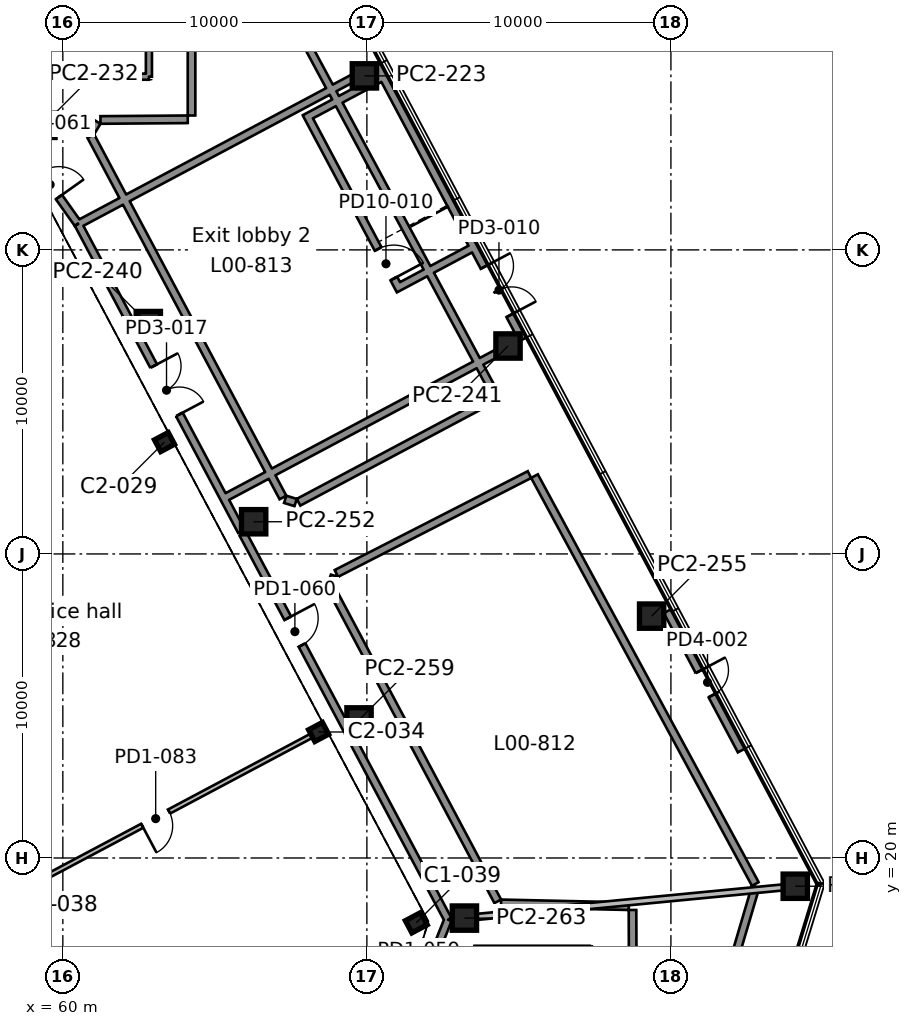
"""IFC4 building model, lengths in metres.
Left out: names, types, materials, properties, quantities, classifications, styles, units other than length and angle.
Written with IfcOpenShell. Run it as: python <this file> out.ifc"""

import sys

from ifc_helpers import new_model, si_unit, direction, frame, frame_2d, origin, origin_2d, place, context, subcontext, project, spatial, rectangle, i_section, extrude, element, fill, save


model = new_model("IFC4")
c1 = context("Model", 3, precision=1e-05, world=origin(), true_north=direction((0.0, 1.0)))
c2 = subcontext(c1, "Body", "Model", "MODEL_VIEW")
j1 = project(units=[si_unit("LENGTHUNIT", "METRE"), si_unit("PLANEANGLEUNIT", "RADIAN")], contexts=[c1])
p1 = place(None, origin())
s1 = spatial("IfcSite", under=j1, at=p1, CompositionType="ELEMENT")
p2 = place(p1, origin())
s2 = spatial("IfcBuilding", under=s1, at=p2, CompositionType="ELEMENT")
p3 = place(p2, origin())
s3 = spatial("IfcBuildingStorey", under=s2, at=p3, CompositionType="ELEMENT", Elevation=0.0)
p4 = place(p3, frame((71.625, 17.871, 0.0), z_axis=(0.0, 0.0, 1.0), x_axis=(-0.469471562786, 0.882947592859, 0.0)))
e1 = element("IfcColumn", 1, at=p4, inside=s3, PredefinedType="COLUMN", context=c2, shape_type="SweptSolid", body=[
    extrude(i_section(OverallWidth=0.455, OverallDepth=0.569, WebThickness=0.078, FlangeThickness=0.125, FilletRadius=0.015, at=origin_2d()), origin(), (0.0, 0.0, 1.0), 7.0),
])
for number, where, z_axis, x_axis in (
    (2, (68.413, 24.144, 0.0), (0.0, 0.0, 1.0), (-0.469, 0.883, 0.0)),
    (3, (63.343, 33.68, 0.0), (0.0, 0.0, 1.0), (-0.469, 0.883, 0.0)),
):
    element("IfcColumn", number, at=place(p3, frame(where, z_axis=z_axis, x_axis=x_axis)), inside=s3, PredefinedType="COLUMN", context=c2, shape_type="SweptSolid", body=[
        extrude(i_section(OverallWidth=0.437, OverallDepth=0.513, WebThickness=0.061, FlangeThickness=0.097, FilletRadius=0.015, at=origin_2d()), origin(), (0.0, 0.0, 1.0), 7.0),
    ])
for number, where, z_axis, x_axis in (
    (4, (73.208, 18.023, 0.0), (0.0, 0.0, 1.0), (1.0, 0.0, 0.0)),
    (5, (84.09, 19.071, 0.0), (0.0, 0.0, 1.0), (1.0, 0.0, 0.0)),
    (6, (69.742, 24.541, 0.0), (0.0, 0.0, 1.0), (1.0, 0.0, 0.0)),
    (7, (79.366, 27.955, 0.0), (0.0, 0.0, 1.0), (1.0, 0.0, 0.0)),
    (8, (66.276, 31.059, 0.0), (0.0, 0.0, 1.0), (1.0, 0.0, 0.0)),
    (9, (74.642, 36.839, 0.0), (0.0, 0.0, 1.0), (1.0, 0.0, 0.0)),
    (10, (62.811, 37.577, 0.0), (0.0, 0.0, 1.0), (1.0, 0.0, 0.0)),
    (11, (59.345, 44.096, 0.0), (0.0, 0.0, 1.0), (1.0, 0.0, 0.0)),
    (12, (69.918, 45.723, 0.0), (0.0, 0.0, 1.0), (1.0, 0.0, 0.0)),
):
    element("IfcColumn", number, at=place(p3, frame(where, z_axis=z_axis, x_axis=x_axis)), inside=s3, PredefinedType="COLUMN", context=c2, shape_type="SweptSolid", body=[
        extrude(rectangle(XDim=0.8, YDim=0.8, at=origin_2d()), origin(), (0.0, 0.0, 1.0), 6.37),
    ])
p5 = place(p3, frame((82.379, 23.567, 0.0), z_axis=(0.0, 0.0, 1.0), x_axis=(-0.469469391506, 0.882948747345, 0.0)))
e13 = element("IfcWall", 13, at=p5, inside=s3, PredefinedType="SOLIDWALL", context=c2, shape_type="SweptSolid", body=[
    extrude(rectangle(XDim=5.189, YDim=0.4, at=frame_2d((2.594, 0.0))), origin(), (0.0, 0.0, 1.0), 6.37),
])
p6 = place(p5, frame((2.052, 0.0, 0.0)))
e14 = element("IfcOpeningElement", 14, at=p6, cuts=e13, PredefinedType="OPENING", context=c2, shape_type="SweptSolid", body=[
    extrude(rectangle(XDim=0.9, YDim=2.1, at=frame_2d((0.45, 1.05))), frame((0.0, 0.21, 0.0), z_axis=(0.0, -1.0, 0.0), x_axis=(1.0, 0.0, 0.0)), (0.0, 0.0, 1.0), 0.42),
])
p7 = place(p3, frame((75.189, 37.088, 0.0), z_axis=(0.0, 0.0, 1.0), x_axis=(-0.469475745628, 0.88294536879, 0.0)))
e15 = element("IfcWall", 15, at=p7, inside=s3, PredefinedType="SOLIDWALL", context=c2, shape_type="SweptSolid", body=[
    extrude(rectangle(XDim=10.209, YDim=0.4, at=frame_2d((5.104, 0.0))), origin(), (0.0, 0.0, 1.0), 6.37),
])
p8 = place(p7, frame((0.9, 0.0, 0.0)))
e16 = element("IfcOpeningElement", 16, at=p8, cuts=e15, PredefinedType="OPENING", context=c2, shape_type="SweptSolid", body=[
    extrude(rectangle(XDim=1.8, YDim=2.1, at=frame_2d((0.9, 1.05))), frame((0.0, 0.21, 0.0), z_axis=(0.0, -1.0, 0.0), x_axis=(1.0, 0.0, 0.0)), (0.0, 0.0, 1.0), 0.42),
])
p9 = place(p3, frame((78.76, 11.985, 7.0), z_axis=(0.0, 0.0, 1.0), x_axis=(-0.003678581112, 0.999993233998, 0.0)))
e17 = element("IfcWall", 17, at=p9, inside=s3, PredefinedType="STANDARD", context=c2, shape_type="SweptSolid", body=[
    extrude(rectangle(XDim=6.305, YDim=0.25, at=frame_2d((3.152, 0.0))), origin(), (0.0, 0.0, 1.0), 0.65),
])
p10 = place(p3, frame((78.615, 18.415, 7.0), z_axis=(0.0, 0.0, 1.0), x_axis=(-0.999755151848, 0.022127728178, 0.0)))
e18 = element("IfcWall", 18, at=p10, inside=s3, PredefinedType="STANDARD", context=c2, shape_type="SweptSolid", body=[
    extrude(rectangle(XDim=4.204, YDim=0.25, at=frame_2d((2.102, 0.0))), origin(), (0.0, 0.0, 1.0), 0.65),
])
p11 = place(p3, frame((74.304, 18.574, 7.0), z_axis=(0.0, 0.0, 1.0), x_axis=(-0.469619931493, 0.882868687827, 0.0)))
e19 = element("IfcWall", 19, at=p11, inside=s3, PredefinedType="STANDARD", context=c2, shape_type="SweptSolid", body=[
    extrude(rectangle(XDim=11.637, YDim=0.25, at=frame_2d((5.819, 0.0))), origin(), (0.0, 0.0, 1.0), 0.65),
])
p12 = place(p3, frame((68.83, 28.944, 7.0), z_axis=(0.0, 0.0, 1.0), x_axis=(0.292496972515, 0.956266448784, 0.0)))
e20 = element("IfcWall", 20, at=p12, inside=s3, PredefinedType="STANDARD", context=c2, shape_type="SweptSolid", body=[
    extrude(rectangle(XDim=0.356, YDim=0.25, at=frame_2d((0.178, 0.0))), origin(), (0.0, 0.0, 1.0), 0.65),
])
p13 = place(p3, frame((68.997, 29.359, 7.0), z_axis=(0.0, 0.0, 1.0), x_axis=(0.890192001807, 0.455585557189, 0.0)))
e21 = element("IfcWall", 21, at=p13, inside=s3, PredefinedType="STANDARD", context=c2, shape_type="SweptSolid", body=[
    extrude(rectangle(XDim=7.134, YDim=0.25, at=frame_2d((3.567, 0.0))), origin(), (0.0, 0.0, 1.0), 0.65),
])
p14 = place(p3, frame((75.513, 32.559, 7.0), z_axis=(0.0, 0.0, 1.0), x_axis=(0.476092369677, -0.879395278322, 0.0)))
e22 = element("IfcWall", 22, at=p14, inside=s3, PredefinedType="STANDARD", context=c2, shape_type="SweptSolid", body=[
    extrude(rectangle(XDim=15.254, YDim=0.25, at=frame_2d((7.627, 0.0))), origin(), (0.0, 0.0, 1.0), 0.65),
])
p15 = place(p3, frame((82.785, 19.05, 7.0), z_axis=(0.0, 0.0, 1.0), x_axis=(-0.28349877708, -0.958972597833, 0.0)))
e23 = element("IfcWall", 23, at=p15, inside=s3, PredefinedType="STANDARD", context=c2, shape_type="SweptSolid", body=[
    extrude(rectangle(XDim=12.437, YDim=0.25, at=frame_2d((6.219, 0.0))), origin(), (0.0, 0.0, 1.0), 0.65),
])
p16 = place(p3, frame((61.932, 58.099, 7.0), z_axis=(0.0, 0.0, 1.0), x_axis=(0.473465440849, -0.880812395645, 0.0)))
e24 = element("IfcWall", 24, at=p16, inside=s3, PredefinedType="STANDARD", context=c2, shape_type="SweptSolid", body=[
    extrude(rectangle(XDim=25.663, YDim=0.25, at=frame_2d((12.831, 0.0))), origin(), (0.0, 0.0, 1.0), 0.65),
])
p17 = place(p3, frame((74.092, 35.399, 7.0), z_axis=(0.0, 0.0, 1.0), x_axis=(-0.292409013933, -0.956293348597, 0.0)))
e25 = element("IfcWall", 25, at=p17, inside=s3, PredefinedType="STANDARD", context=c2, shape_type="SweptSolid", body=[
    extrude(rectangle(XDim=0.358, YDim=0.25, at=frame_2d((0.179, 0.0))), origin(), (0.0, 0.0, 1.0), 0.65),
])
p18 = place(p3, frame((73.926, 34.983, 7.0), z_axis=(0.0, 0.0, 1.0), x_axis=(-0.882946601909, -0.469473426487, 0.0)))
e26 = element("IfcWall", 26, at=p18, inside=s3, PredefinedType="STANDARD", context=c2, shape_type="SweptSolid", body=[
    extrude(rectangle(XDim=6.993, YDim=0.25, at=frame_2d((3.497, 0.0))), origin(), (0.0, 0.0, 1.0), 0.65),
])
p19 = place(p3, frame((67.656, 31.691, 7.0), z_axis=(0.0, 0.0, 1.0), x_axis=(-0.956351571051, 0.292218535599, 0.0)))
e27 = element("IfcWall", 27, at=p19, inside=s3, PredefinedType="STANDARD", context=c2, shape_type="SweptSolid", body=[
    extrude(rectangle(XDim=0.358, YDim=0.25, at=frame_2d((0.179, 0.0))), origin(), (0.0, 0.0, 1.0), 0.65),
])
p20 = place(p3, frame((67.24, 31.857, 7.0), z_axis=(0.0, 0.0, 1.0), x_axis=(-0.469474314258, 0.88294612987, 0.0)))
e28 = element("IfcWall", 28, at=p20, inside=s3, PredefinedType="STANDARD", context=c2, shape_type="SweptSolid", body=[
    extrude(rectangle(XDim=13.462, YDim=0.25, at=frame_2d((6.731, 0.0))), origin(), (0.0, 0.0, 1.0), 0.65),
])
p21 = place(p3, frame((60.923, 43.866, 7.0), z_axis=(0.0, 0.0, 1.0), x_axis=(0.515472974842, 0.856905836255, 0.0)))
e29 = element("IfcWall", 29, at=p21, inside=s3, PredefinedType="STANDARD", context=c2, shape_type="SweptSolid", body=[
    extrude(rectangle(XDim=0.404, YDim=0.25, at=frame_2d((0.202, 0.0))), origin(), (0.0, 0.0, 1.0), 0.65),
])
p22 = place(p3, frame((61.237, 44.273, 7.0), z_axis=(0.0, 0.0, 1.0), x_axis=(0.999970067376, 0.007737205691, 0.0)))
e30 = element("IfcWall", 30, at=p22, inside=s3, PredefinedType="STANDARD", context=c2, shape_type="SweptSolid", body=[
    extrude(rectangle(XDim=2.871, YDim=0.25, at=frame_2d((1.436, 0.0))), origin(), (0.0, 0.0, 1.0), 0.65),
])
p23 = place(p3, frame((64.233, 44.42, 7.0), z_axis=(0.0, 0.0, 1.0), x_axis=(0.0, 1.0, 0.0)))
e31 = element("IfcWall", 31, at=p23, inside=s3, PredefinedType="STANDARD", context=c2, shape_type="SweptSolid", body=[
    extrude(rectangle(XDim=6.353, YDim=0.25, at=frame_2d((3.177, 0.0))), origin(), (0.0, 0.0, 1.0), 0.65),
])
for number, where, z_axis, x_axis in (
    (32, (73.535, 17.013, 6.92), (0.0, 0.0, 1.0), (1.0, 0.0, 0.0)),
    (33, (62.831, 45.697, 6.92), (0.0, 0.0, 1.0), (-1.0, 0.0, 0.0)),
    (34, (62.831, 49.497, 6.92), (0.0, 0.0, 1.0), (0.0, -1.0, 0.0)),
):
    element("IfcWall", number, at=place(p3, frame(where, z_axis=z_axis, x_axis=x_axis)), inside=s3, PredefinedType="SOLIDWALL", context=c2, shape_type="SweptSolid", body=[
        extrude(rectangle(XDim=3.8, YDim=0.2, at=frame_2d((1.9, 0.0))), origin(), (0.0, 0.0, 1.0), 0.18),
    ])
p24 = place(p3, frame((83.69, 19.032, 0.0), z_axis=(0.0, 0.0, 1.0), x_axis=(-0.995397009029, -0.095837333105, 0.0)))
e35 = element("IfcWall", 35, at=p24, inside=s3, PredefinedType="PARTITIONING", context=c2, shape_type="SweptSolid", body=[
    extrude(rectangle(XDim=10.129, YDim=0.2, at=frame_2d((5.064, 0.0))), origin(), (0.0, 0.0, 1.0), 6.37),
])
p25 = place(p3, frame((72.669, 17.971, 0.0), z_axis=(0.0, 0.0, 1.0), x_axis=(-0.370009777786, -0.929027859831, 0.0)))
e36 = element("IfcWall", 36, at=p25, inside=s3, PredefinedType="SOLIDWALL", context=c2, shape_type="SweptSolid", body=[
    extrude(rectangle(XDim=5.184, YDim=0.25, at=frame_2d((2.592, 0.0))), origin(), (0.0, 0.0, 1.0), 6.37),
])
p26 = place(p25, frame((2.092, 0.0, 0.0)))
e37 = element("IfcOpeningElement", 37, at=p26, cuts=e36, PredefinedType="OPENING", context=c2, shape_type="SweptSolid", body=[
    extrude(rectangle(XDim=1.0, YDim=2.1, at=frame_2d((0.5, 1.05))), frame((0.0, 0.135, 0.0), z_axis=(0.0, -1.0, 0.0), x_axis=(1.0, 0.0, 0.0)), (0.0, 0.0, 1.0), 0.27),
])
p27 = place(p3, frame((74.242, 36.585, 0.0), z_axis=(0.0, 0.0, 1.0), x_axis=(-0.882936179938, -0.469493026738, 0.0)))
e38 = element("IfcWall", 38, at=p27, inside=s3, PredefinedType="SOLIDWALL", context=c2, shape_type="SweptSolid", body=[
    extrude(rectangle(XDim=10.127, YDim=0.25, at=frame_2d((5.063, 0.0))), origin(), (0.0, 0.0, 1.0), 6.37),
])
p28 = place(p3, frame((65.303, 31.825, 0.0), z_axis=(0.0, 0.0, 1.0), x_axis=(0.46947695358, -0.882944726502, 0.0)))
e39 = element("IfcWall", 39, at=p28, inside=s3, PredefinedType="SOLIDWALL", context=c2, shape_type="SweptSolid", body=[
    extrude(rectangle(XDim=1.22, YDim=0.25, at=frame_2d((0.61, 0.0))), origin(), (0.0, 0.0, 1.0), 6.37),
])
p29 = place(p3, frame((65.923, 30.659, 0.0), z_axis=(0.0, 0.0, 1.0), x_axis=(0.469479540895, -0.882943350777, 0.0)))
e40 = element("IfcWall", 40, at=p29, inside=s3, PredefinedType="SOLIDWALL", context=c2, shape_type="SweptSolid", body=[
    extrude(rectangle(XDim=7.283, YDim=0.25, at=frame_2d((3.642, 0.0))), origin(), (0.0, 0.0, 1.0), 6.37),
])
p30 = place(p29, frame((3.141, 0.0, 0.0)))
e41 = element("IfcOpeningElement", 41, at=p30, cuts=e40, PredefinedType="OPENING", context=c2, shape_type="SweptSolid", body=[
    extrude(rectangle(XDim=1.0, YDim=2.1, at=frame_2d((0.5, 1.05))), frame((0.0, 0.135, 0.0), z_axis=(0.0, -1.0, 0.0), x_axis=(1.0, 0.0, 0.0)), (0.0, 0.0, 1.0), 0.27),
])
p31 = place(p3, frame((69.389, 24.141, 0.0), z_axis=(0.0, 0.0, 1.0), x_axis=(0.469461736628, -0.882952817449, 0.0)))
e42 = element("IfcWall", 42, at=p31, inside=s3, PredefinedType="SOLIDWALL", context=c2, shape_type="SweptSolid", body=[
    extrude(rectangle(XDim=6.988, YDim=0.25, at=frame_2d((3.494, 0.0))), origin(), (0.0, 0.0, 1.0), 6.37),
])
p32 = place(p3, frame((69.518, 45.635, 0.0), z_axis=(0.0, 0.0, 1.0), x_axis=(-0.882956154604, -0.46945546013, 0.0)))
e43 = element("IfcWall", 43, at=p32, inside=s3, PredefinedType="SOLIDWALL", context=c2, shape_type="SweptSolid", body=[
    extrude(rectangle(XDim=10.206, YDim=0.25, at=frame_2d((5.103, 0.0))), origin(), (0.0, 0.0, 1.0), 6.37),
])
p33 = place(p3, frame((60.505, 40.848, 0.0), z_axis=(0.0, 0.0, 1.0), x_axis=(0.469448377302, -0.882959920409, 0.0)))
e44 = element("IfcWall", 44, at=p33, inside=s3, PredefinedType="SOLIDWALL", context=c2, shape_type="SweptSolid", body=[
    extrude(rectangle(XDim=4.059, YDim=0.25, at=frame_2d((2.03, 0.0))), origin(), (0.0, 0.0, 1.0), 6.37),
])
p34 = place(p3, frame((62.457, 37.177, 0.0), z_axis=(0.0, 0.0, 1.0), x_axis=(0.469458615732, -0.882954476808, 0.0)))
e45 = element("IfcWall", 45, at=p34, inside=s3, PredefinedType="SOLIDWALL", context=c2, shape_type="SweptSolid", body=[
    extrude(rectangle(XDim=6.06, YDim=0.25, at=frame_2d((3.03, 0.0))), origin(), (0.0, 0.0, 1.0), 6.37),
])
p35 = place(p34, frame((1.13, 0.0, 0.0)))
e46 = element("IfcOpeningElement", 46, at=p35, cuts=e45, PredefinedType="OPENING", context=c2, shape_type="SweptSolid", body=[
    extrude(rectangle(XDim=1.8, YDim=2.1, at=frame_2d((0.9, 1.05))), frame((0.0, 0.135, 0.0), z_axis=(0.0, -1.0, 0.0), x_axis=(1.0, 0.0, 0.0)), (0.0, 0.0, 1.0), 0.27),
])
p36 = place(p3, frame((58.672, 43.428, 0.0), z_axis=(0.0, 0.0, 1.0), x_axis=(0.578928632739, -0.815378217881, 0.0)))
e47 = element("IfcWall", 47, at=p36, inside=s3, PredefinedType="SOLIDWALL", context=c2, shape_type="SweptSolid", body=[
    extrude(rectangle(XDim=3.143, YDim=0.25, at=frame_2d((1.572, 0.0))), origin(), (0.0, 0.0, 1.0), 6.37),
])
p37 = place(p36, frame((1.072, 0.0, 0.0)))
e48 = element("IfcOpeningElement", 48, at=p37, cuts=e47, PredefinedType="OPENING", context=c2, shape_type="SweptSolid", body=[
    extrude(rectangle(XDim=1.0, YDim=2.1, at=frame_2d((0.5, 1.05))), frame((0.0, 0.135, 0.0), z_axis=(0.0, -1.0, 0.0), x_axis=(1.0, 0.0, 0.0)), (0.0, 0.0, 1.0), 0.27),
])
p38 = place(p3, frame((57.957, 18.584, 0.0), z_axis=(0.0, 0.0, 1.0), x_axis=(0.882944872937, 0.469476678179, 0.0)))
e49 = element("IfcWall", 49, at=p38, inside=s3, PredefinedType="PARTITIONING", context=c2, shape_type="SweptSolid", body=[
    extrude(rectangle(XDim=11.586, YDim=0.15, at=frame_2d((5.793, 0.0))), origin(), (0.0, 0.0, 1.0), 6.55),
])
p39 = place(p38, frame((5.273, 0.0, 0.0)))
e50 = element("IfcOpeningElement", 50, at=p39, cuts=e49, PredefinedType="OPENING", context=c2, shape_type="SweptSolid", body=[
    extrude(rectangle(XDim=1.0, YDim=2.1, at=frame_2d((0.5, 1.05))), frame((0.0, 0.085, 0.0), z_axis=(0.0, -1.0, 0.0), x_axis=(1.0, 0.0, 0.0)), (0.0, 0.0, 1.0), 0.17),
])
p40 = place(p3, frame((62.24, 9.894, 0.0), z_axis=(0.0, 0.0, 1.0), x_axis=(-0.469471003187, 0.882947890403, 0.0)))
e51 = element("IfcWall", 51, at=p40, inside=s3, PredefinedType="PARTITIONING", context=c2, shape_type="SweptSolid", body=[
    extrude(rectangle(XDim=9.326, YDim=0.15, at=frame_2d((4.663, 0.0))), origin(), (0.0, 0.0, 1.0), 6.55),
])
p41 = place(p3, frame((73.4, 40.027, 0.0), z_axis=(0.0, 0.0, 1.0), x_axis=(-0.882970050864, -0.469429322983, 0.0)))
e52 = element("IfcWall", 52, at=p41, inside=s3, PredefinedType="SOLIDWALL", context=c2, shape_type="SweptSolid", body=[
    extrude(rectangle(XDim=2.8, YDim=0.25, at=frame_2d((1.4, 0.0))), origin(), (0.0, 0.0, 1.0), 6.37),
])
p42 = place(p3, frame((70.419, 45.633, 0.0), z_axis=(0.0, 0.0, 1.0), x_axis=(-0.882950835185, -0.469465464807, 0.0)))
e53 = element("IfcWall", 53, at=p42, inside=s3, PredefinedType="SOLIDWALL", context=c2, shape_type="SweptSolid", body=[
    extrude(rectangle(XDim=2.8, YDim=0.25, at=frame_2d((1.4, 0.0))), origin(), (0.0, 0.0, 1.0), 6.37),
])
p43 = place(p3, frame((71.097, 38.66, 0.0), z_axis=(0.0, 0.0, 1.0), x_axis=(-0.469489660743, 0.882937969766, 0.0)))
e54 = element("IfcWall", 54, at=p43, inside=s3, PredefinedType="SOLIDWALL", context=c2, shape_type="SweptSolid", body=[
    extrude(rectangle(XDim=6.6, YDim=0.25, at=frame_2d((3.3, 0.0))), origin(), (0.0, 0.0, 1.0), 6.37),
])
p44 = place(p43, frame((0.45, 0.0, 0.0)))
e55 = element("IfcOpeningElement", 55, at=p44, cuts=e54, PredefinedType="OPENING", context=c2, shape_type="SweptSolid", body=[
    extrude(rectangle(XDim=1.1, YDim=2.1, at=frame_2d((0.55, 1.05))), frame((0.0, 0.135, 0.0), z_axis=(0.0, -1.0, 0.0), x_axis=(1.0, 0.0, 0.0)), (0.0, 0.0, 1.0), 0.27),
])
p45 = place(p6, frame((0.9, 0.0, 0.0), z_axis=(0.0, 0.0, 1.0), x_axis=(-1.0, 0.0, 0.0)))
e56 = element("IfcDoor", 56, at=p45, inside=s3, OperationType="SINGLE_SWING_LEFT", PredefinedType="DOOR", context=c2, shape_type="SweptSolid", body=[
    extrude(rectangle(XDim=0.9, YDim=2.1, at=frame_2d((0.45, 1.05))), frame((0.0, 0.025, 0.0), z_axis=(0.0, -1.0, 0.0), x_axis=(1.0, 0.0, 0.0)), (0.0, 0.0, 1.0), 0.05),
])
fill(e14, e56)
p46 = place(p8, frame((1.8, 0.0, 0.0), z_axis=(0.0, 0.0, 1.0), x_axis=(-1.0, 0.0, 0.0)))
e57 = element("IfcDoor", 57, at=p46, inside=s3, OperationType="DOUBLE_DOOR_SINGLE_SWING", PredefinedType="DOOR", context=c2, shape_type="SweptSolid", body=[
    extrude(rectangle(XDim=1.8, YDim=2.1, at=frame_2d((0.9, 1.05))), frame((0.0, 0.025, 0.0), z_axis=(0.0, -1.0, 0.0), x_axis=(1.0, 0.0, 0.0)), (0.0, 0.0, 1.0), 0.05),
])
fill(e16, e57)
p47 = place(p3, frame((0.0, 0.0, 6.37)))
p48 = place(p47, frame((60.931, 47.597, 0.0)))
p49 = place(p48, frame((0.0, 0.0, 0.5)))
e58 = element("IfcWindow", 58, at=p49, inside=s3, PartitioningType="SINGLE_PANEL", PredefinedType="SKYLIGHT", context=c2, shape_type="SweptSolid", body=[
    extrude(rectangle(XDim=3.6, YDim=3.6, at=origin_2d()), origin(), (0.0, 0.0, 1.0), 0.05),
])
p50 = place(p44, frame((1.1, 0.0, 0.0), z_axis=(0.0, 0.0, 1.0), x_axis=(-1.0, 0.0, 0.0)))
e59 = element("IfcDoor", 59, at=p50, inside=s3, OperationType="SINGLE_SWING_RIGHT", PredefinedType="DOOR", context=c2, shape_type="SweptSolid", body=[
    extrude(rectangle(XDim=1.1, YDim=2.1, at=frame_2d((0.55, 1.05))), frame((0.0, 0.025, 0.0), z_axis=(0.0, -1.0, 0.0), x_axis=(1.0, 0.0, 0.0)), (0.0, 0.0, 1.0), 0.05),
])
fill(e55, e59)
p51 = place(p39, frame((1.0, 0.0, 0.0), z_axis=(0.0, 0.0, 1.0), x_axis=(-1.0, 0.0, 0.0)))
e60 = element("IfcDoor", 60, at=p51, inside=s3, OperationType="SINGLE_SWING_RIGHT", PredefinedType="DOOR", context=c2, shape_type="SweptSolid", body=[
    extrude(rectangle(XDim=1.0, YDim=2.1, at=frame_2d((0.5, 1.05))), frame((0.0, 0.025, 0.0), z_axis=(0.0, -1.0, 0.0), x_axis=(1.0, 0.0, 0.0)), (0.0, 0.0, 1.0), 0.05),
])
fill(e50, e60)
p52 = place(p30, origin())
e61 = element("IfcDoor", 61, at=p52, inside=s3, OperationType="SINGLE_SWING_LEFT", PredefinedType="DOOR", context=c2, shape_type="SweptSolid", body=[
    extrude(rectangle(XDim=1.0, YDim=2.1, at=frame_2d((0.5, 1.05))), frame((0.0, 0.025, 0.0), z_axis=(0.0, -1.0, 0.0), x_axis=(1.0, 0.0, 0.0)), (0.0, 0.0, 1.0), 0.05),
])
fill(e41, e61)
p53 = place(p35, origin())
e62 = element("IfcDoor", 62, at=p53, inside=s3, OperationType="DOUBLE_DOOR_SINGLE_SWING", PredefinedType="DOOR", context=c2, shape_type="SweptSolid", body=[
    extrude(rectangle(XDim=1.8, YDim=2.1, at=frame_2d((0.9, 1.05))), frame((0.0, 0.025, 0.0), z_axis=(0.0, -1.0, 0.0), x_axis=(1.0, 0.0, 0.0)), (0.0, 0.0, 1.0), 0.05),
])
fill(e46, e62)
p54 = place(p37, origin())
e63 = element("IfcDoor", 63, at=p54, inside=s3, OperationType="SINGLE_SWING_RIGHT", PredefinedType="DOOR", context=c2, shape_type="SweptSolid", body=[
    extrude(rectangle(XDim=1.0, YDim=2.1, at=frame_2d((0.5, 1.05))), frame((0.0, 0.025, 0.0), z_axis=(0.0, -1.0, 0.0), x_axis=(1.0, 0.0, 0.0)), (0.0, 0.0, 1.0), 0.05),
])
fill(e48, e63)
save(model, sys.argv[1])
